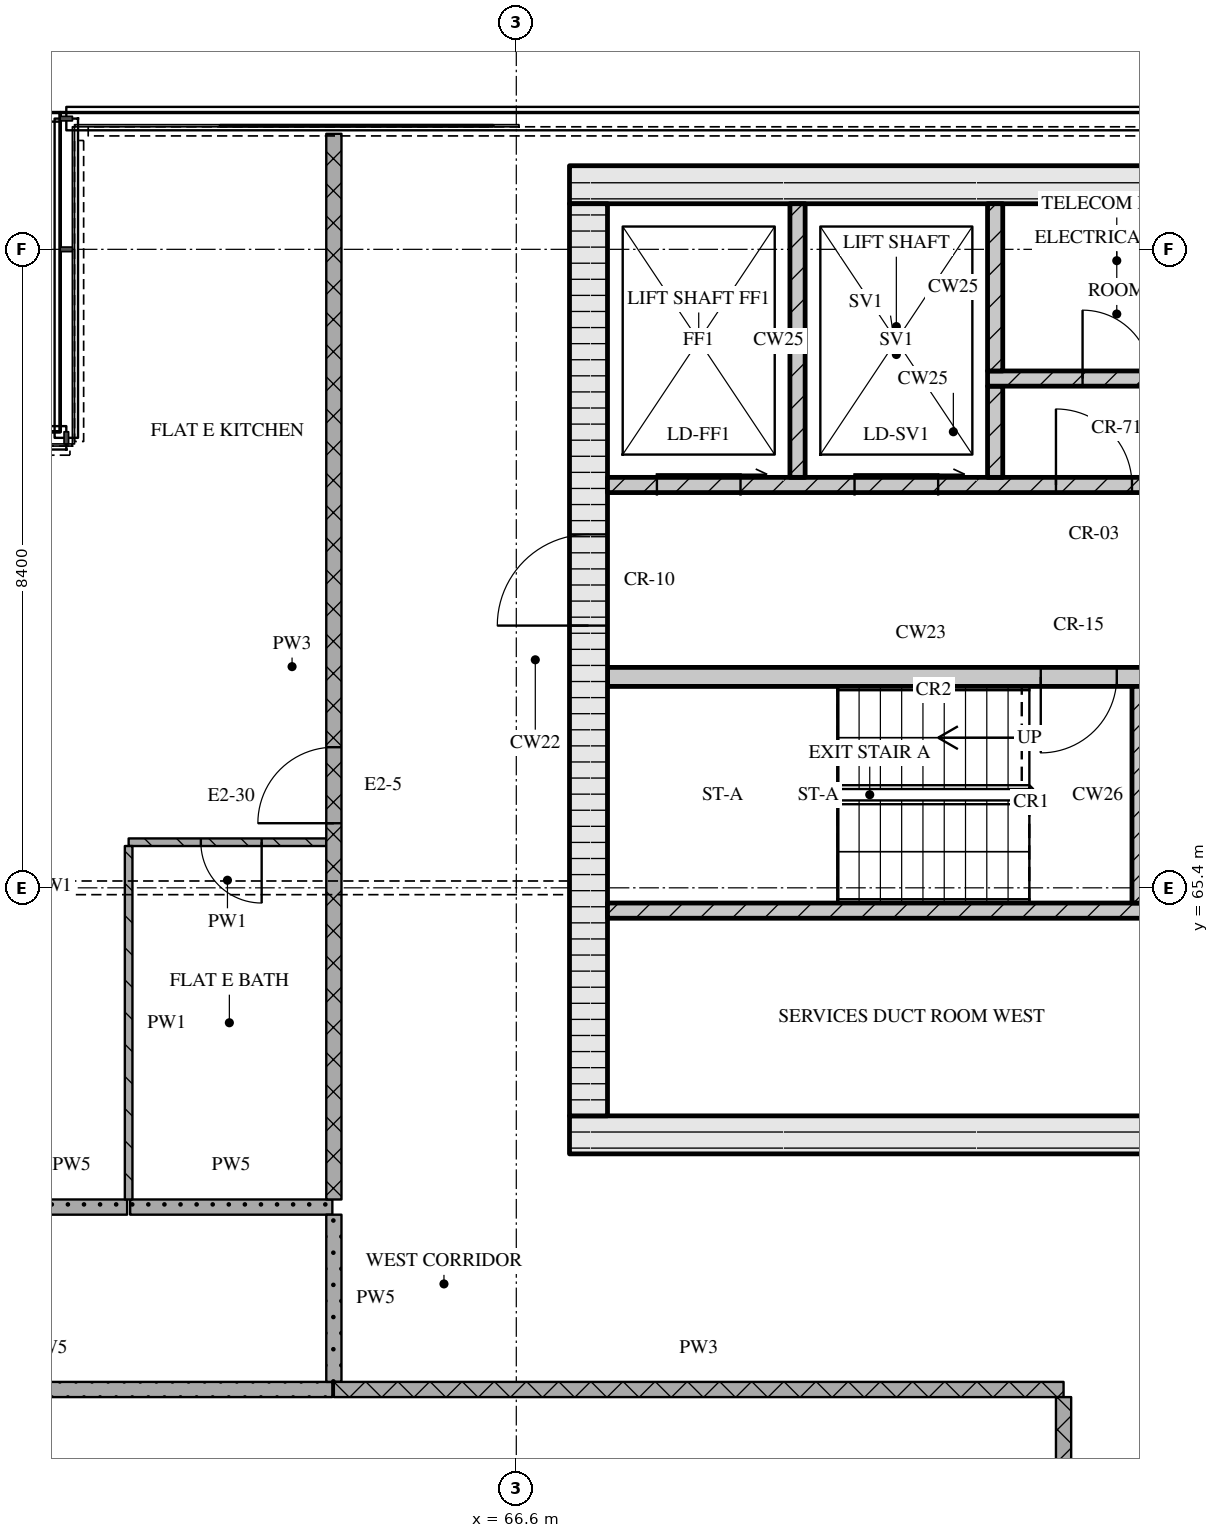
"""IFC4 building model, lengths in metres.
Left out: names, types, materials, properties, quantities, classifications, styles, units other than length and angle.
Written with IfcOpenShell. Run it as: python <this file> out.ifc"""

import sys

from ifc_helpers import new_model, si_unit, direction, frame, frame_2d, origin, place, context, subcontext, project, spatial, rectangle, extrude, element, fill, save


model = new_model("IFC4")
c1 = context("Model", 3, precision=1e-05, world=origin(), true_north=direction((0.0, 1.0)))
c2 = subcontext(c1, "Body", "Model", "MODEL_VIEW")
j1 = project(units=[si_unit("LENGTHUNIT", "METRE"), si_unit("PLANEANGLEUNIT", "RADIAN")], contexts=[c1])
p1 = place(None, origin())
s1 = spatial("IfcSite", under=j1, at=p1, CompositionType="ELEMENT")
p2 = place(p1, origin())
s2 = spatial("IfcBuilding", under=s1, at=p2, CompositionType="ELEMENT")
p3 = place(p2, frame((0.0, 0.0, 270.75)))
s3 = spatial("IfcBuildingStorey", under=s2, at=p3, CompositionType="ELEMENT", Elevation=270.75)
p4 = place(p3, frame((67.3, 62.15, 0.0), z_axis=(0.0, 0.0, 1.0), x_axis=(1.0, 0.0, 0.0)))
e1 = element("IfcWall", 1, at=p4, inside=s3, PredefinedType="SOLIDWALL", context=c2, shape_type="SweptSolid", body=[
    extrude(rectangle(XDim=40.6, YDim=0.5, at=frame_2d((20.3, 0.0))), origin(), (0.0, 0.0, 1.0), 3.32),
])
p5 = place(p4, frame((20.65, 0.0, 0.0)))
e2 = element("IfcOpeningElement", 2, at=p5, cuts=e1, PredefinedType="OPENING", context=c2, shape_type="SweptSolid", body=[
    extrude(rectangle(XDim=1.8, YDim=2.1, at=frame_2d((0.9, 1.05))), frame((0.0, 0.26, 0.0), z_axis=(0.0, -1.0, 0.0), x_axis=(1.0, 0.0, 0.0)), (0.0, 0.0, 1.0), 0.52),
])
p6 = place(p3, frame((67.3, 74.65, 0.0), z_axis=(0.0, 0.0, 1.0), x_axis=(1.0, 0.0, 0.0)))
e3 = element("IfcWall", 3, at=p6, inside=s3, PredefinedType="SOLIDWALL", context=c2, shape_type="SweptSolid", body=[
    extrude(rectangle(XDim=40.6, YDim=0.5, at=frame_2d((20.3, 0.0))), origin(), (0.0, 0.0, 1.0), 3.32),
])
p7 = place(p3, frame((67.55, 62.4, 0.0), z_axis=(0.0, 0.0, 1.0), x_axis=(0.0, 1.0, 0.0)))
e4 = element("IfcWall", 4, at=p7, inside=s3, PredefinedType="SOLIDWALL", context=c2, shape_type="SweptSolid", body=[
    extrude(rectangle(XDim=12.0, YDim=0.5, at=frame_2d((6.0, 0.0))), origin(), (0.0, 0.0, 1.0), 3.32),
])
p8 = place(p7, frame((6.45, 0.0, 0.0)))
e5 = element("IfcOpeningElement", 5, at=p8, cuts=e4, PredefinedType="OPENING", context=c2, shape_type="SweptSolid", body=[
    extrude(rectangle(XDim=1.2, YDim=2.1, at=frame_2d((0.6, 1.05))), frame((0.0, 0.26, 0.0), z_axis=(0.0, -1.0, 0.0), x_axis=(1.0, 0.0, 0.0)), (0.0, 0.0, 1.0), 0.52),
])
p9 = place(p3, frame((67.8, 65.1, 0.0), z_axis=(0.0, 0.0, 1.0), x_axis=(1.0, 0.0, 0.0)))
e6 = element("IfcWall", 6, at=p9, inside=s3, PredefinedType="SOLIDWALL", context=c2, shape_type="SweptSolid", body=[
    extrude(rectangle(XDim=18.5, YDim=0.2, at=frame_2d((9.25, 0.0))), origin(), (0.0, 0.0, 1.0), 3.32),
])
p10 = place(p9, frame((7.27, 0.0, 0.0)))
e7 = element("IfcOpeningElement", 7, at=p10, cuts=e6, PredefinedType="OPENING", context=c2, shape_type="SweptSolid", body=[
    extrude(rectangle(XDim=0.9, YDim=2.1, at=frame_2d((0.45, 1.05))), frame((0.0, 0.11, 0.0), z_axis=(0.0, -1.0, 0.0), x_axis=(1.0, 0.0, 0.0)), (0.0, 0.0, 1.0), 0.22),
])
p11 = place(p9, frame((10.1, 0.0, 0.0)))
e8 = element("IfcOpeningElement", 8, at=p11, cuts=e6, PredefinedType="OPENING", context=c2, shape_type="SweptSolid", body=[
    extrude(rectangle(XDim=0.9, YDim=2.1, at=frame_2d((0.45, 1.05))), frame((0.0, 0.11, 0.0), z_axis=(0.0, -1.0, 0.0), x_axis=(1.0, 0.0, 0.0)), (0.0, 0.0, 1.0), 0.22),
])
p12 = place(p9, frame((13.81, 0.0, 0.0)))
e9 = element("IfcOpeningElement", 9, at=p12, cuts=e6, PredefinedType="OPENING", context=c2, shape_type="SweptSolid", body=[
    extrude(rectangle(XDim=0.9, YDim=2.1, at=frame_2d((0.45, 1.05))), frame((0.0, 0.11, 0.0), z_axis=(0.0, -1.0, 0.0), x_axis=(1.0, 0.0, 0.0)), (0.0, 0.0, 1.0), 0.22),
])
p13 = place(p9, frame((16.7, 0.0, 0.0)))
e10 = element("IfcOpeningElement", 10, at=p13, cuts=e6, PredefinedType="OPENING", context=c2, shape_type="SweptSolid", body=[
    extrude(rectangle(XDim=0.9, YDim=2.1, at=frame_2d((0.45, 1.05))), frame((0.0, 0.11, 0.0), z_axis=(0.0, -1.0, 0.0), x_axis=(1.0, 0.0, 0.0)), (0.0, 0.0, 1.0), 0.22),
])
p14 = place(p3, frame((74.85, 65.2, 0.0), z_axis=(0.0, 0.0, 1.0), x_axis=(0.0, 1.0, 0.0)))
e11 = element("IfcWall", 11, at=p14, inside=s3, PredefinedType="SOLIDWALL", context=c2, shape_type="SweptSolid", body=[
    extrude(rectangle(XDim=2.85, YDim=0.3, at=frame_2d((1.425, 0.0))), origin(), (0.0, 0.0, 1.0), 3.32),
])
p15 = place(p3, frame((67.8, 68.175, 0.0), z_axis=(0.0, 0.0, 1.0), x_axis=(1.0, 0.0, 0.0)))
e12 = element("IfcWall", 12, at=p15, inside=s3, PredefinedType="SOLIDWALL", context=c2, shape_type="SweptSolid", body=[
    extrude(rectangle(XDim=8.25, YDim=0.25, at=frame_2d((4.125, 0.0))), origin(), (0.0, 0.0, 1.0), 3.32),
])
p16 = place(p15, frame((5.7, 0.0, 0.0)))
e13 = element("IfcOpeningElement", 13, at=p16, cuts=e12, PredefinedType="OPENING", context=c2, shape_type="SweptSolid", body=[
    extrude(rectangle(XDim=1.0, YDim=2.1, at=frame_2d((0.5, 1.05))), frame((0.0, 0.135, 0.0), z_axis=(0.0, -1.0, 0.0), x_axis=(1.0, 0.0, 0.0)), (0.0, 0.0, 1.0), 0.27),
])
p17 = place(p15, frame((7.2, 0.0, 0.0)))
e14 = element("IfcOpeningElement", 14, at=p17, cuts=e12, PredefinedType="OPENING", context=c2, shape_type="SweptSolid", body=[
    extrude(rectangle(XDim=0.8, YDim=2.1, at=frame_2d((0.4, 1.05))), frame((0.0, 0.135, 0.0), z_axis=(0.0, -1.0, 0.0), x_axis=(1.0, 0.0, 0.0)), (0.0, 0.0, 1.0), 0.27),
])
p18 = place(p3, frame((67.8, 70.7, 0.0), z_axis=(0.0, 0.0, 1.0), x_axis=(1.0, 0.0, 0.0)))
e15 = element("IfcWall", 15, at=p18, inside=s3, PredefinedType="SOLIDWALL", context=c2, shape_type="SweptSolid", body=[
    extrude(rectangle(XDim=39.6, YDim=0.2, at=frame_2d((19.8, 0.0))), origin(), (0.0, 0.0, 1.0), 3.32),
])
p19 = place(p18, frame((0.65, 0.0, 0.0)))
e16 = element("IfcOpeningElement", 16, at=p19, cuts=e15, PredefinedType="OPENING", context=c2, shape_type="SweptSolid", body=[
    extrude(rectangle(XDim=1.1, YDim=2.1, at=frame_2d((0.55, 1.05))), frame((0.0, 0.11, 0.0), z_axis=(0.0, -1.0, 0.0), x_axis=(1.0, 0.0, 0.0)), (0.0, 0.0, 1.0), 0.22),
])
p20 = place(p18, frame((3.25, 0.0, 0.0)))
e17 = element("IfcOpeningElement", 17, at=p20, cuts=e15, PredefinedType="OPENING", context=c2, shape_type="SweptSolid", body=[
    extrude(rectangle(XDim=1.1, YDim=2.1, at=frame_2d((0.55, 1.05))), frame((0.0, 0.11, 0.0), z_axis=(0.0, -1.0, 0.0), x_axis=(1.0, 0.0, 0.0)), (0.0, 0.0, 1.0), 0.22),
])
p21 = place(p18, frame((5.9, 0.0, 0.0)))
e18 = element("IfcOpeningElement", 18, at=p21, cuts=e15, PredefinedType="OPENING", context=c2, shape_type="SweptSolid", body=[
    extrude(rectangle(XDim=1.0, YDim=2.1, at=frame_2d((0.5, 1.05))), frame((0.0, 0.11, 0.0), z_axis=(0.0, -1.0, 0.0), x_axis=(1.0, 0.0, 0.0)), (0.0, 0.0, 1.0), 0.22),
])
p22 = place(p18, frame((21.7, 0.0, 0.0)))
e19 = element("IfcOpeningElement", 19, at=p22, cuts=e15, PredefinedType="OPENING", context=c2, shape_type="SweptSolid", body=[
    extrude(rectangle(XDim=1.0, YDim=2.1, at=frame_2d((0.5, 1.05))), frame((0.0, 0.11, 0.0), z_axis=(0.0, -1.0, 0.0), x_axis=(1.0, 0.0, 0.0)), (0.0, 0.0, 1.0), 0.22),
])
p23 = place(p18, frame((32.7, 0.0, 0.0)))
e20 = element("IfcOpeningElement", 20, at=p23, cuts=e15, PredefinedType="OPENING", context=c2, shape_type="SweptSolid", body=[
    extrude(rectangle(XDim=1.0, YDim=2.1, at=frame_2d((0.5, 1.05))), frame((0.0, 0.11, 0.0), z_axis=(0.0, -1.0, 0.0), x_axis=(1.0, 0.0, 0.0)), (0.0, 0.0, 1.0), 0.22),
])
p24 = place(p18, frame((35.25, 0.0, 0.0)))
e21 = element("IfcOpeningElement", 21, at=p24, cuts=e15, PredefinedType="OPENING", context=c2, shape_type="SweptSolid", body=[
    extrude(rectangle(XDim=1.1, YDim=2.1, at=frame_2d((0.55, 1.05))), frame((0.0, 0.11, 0.0), z_axis=(0.0, -1.0, 0.0), x_axis=(1.0, 0.0, 0.0)), (0.0, 0.0, 1.0), 0.22),
])
p25 = place(p18, frame((37.85, 0.0, 0.0)))
e22 = element("IfcOpeningElement", 22, at=p25, cuts=e15, PredefinedType="OPENING", context=c2, shape_type="SweptSolid", body=[
    extrude(rectangle(XDim=1.1, YDim=2.1, at=frame_2d((0.55, 1.05))), frame((0.0, 0.11, 0.0), z_axis=(0.0, -1.0, 0.0), x_axis=(1.0, 0.0, 0.0)), (0.0, 0.0, 1.0), 0.22),
])
p26 = place(p3, frame((70.3, 70.8, 0.0), z_axis=(0.0, 0.0, 1.0), x_axis=(0.0, 1.0, 0.0)))
e23 = element("IfcWall", 23, at=p26, inside=s3, PredefinedType="SOLIDWALL", context=c2, shape_type="SweptSolid", body=[
    extrude(rectangle(XDim=3.6, YDim=0.2, at=frame_2d((1.8, 0.0))), origin(), (0.0, 0.0, 1.0), 3.32),
])
p27 = place(p3, frame((72.9, 70.8, 0.0), z_axis=(0.0, 0.0, 1.0), x_axis=(0.0, 1.0, 0.0)))
e24 = element("IfcWall", 24, at=p27, inside=s3, PredefinedType="SOLIDWALL", context=c2, shape_type="SweptSolid", body=[
    extrude(rectangle(XDim=1.2, YDim=0.2, at=frame_2d((0.6, 0.0))), origin(), (0.0, 0.0, 1.0), 3.32),
])
p28 = place(p3, frame((72.8, 72.1, 0.0), z_axis=(0.0, 0.0, 1.0), x_axis=(1.0, 0.0, 0.0)))
e25 = element("IfcWall", 25, at=p28, inside=s3, PredefinedType="SOLIDWALL", context=c2, shape_type="SweptSolid", body=[
    extrude(rectangle(XDim=11.0, YDim=0.2, at=frame_2d((5.5, 0.0))), origin(), (0.0, 0.0, 1.0), 3.32),
])
p29 = place(p28, frame((1.25, 0.0, 0.0)))
e26 = element("IfcOpeningElement", 26, at=p29, cuts=e25, PredefinedType="OPENING", context=c2, shape_type="SweptSolid", body=[
    extrude(rectangle(XDim=0.9, YDim=2.1, at=frame_2d((0.45, 1.05))), frame((0.0, 0.11, 0.0), z_axis=(0.0, -1.0, 0.0), x_axis=(1.0, 0.0, 0.0)), (0.0, 0.0, 1.0), 0.22),
])
p30 = place(p28, frame((4.65, 0.0, 0.0)))
e27 = element("IfcOpeningElement", 27, at=p30, cuts=e25, PredefinedType="OPENING", context=c2, shape_type="SweptSolid", body=[
    extrude(rectangle(XDim=0.9, YDim=2.1, at=frame_2d((0.45, 1.05))), frame((0.0, 0.11, 0.0), z_axis=(0.0, -1.0, 0.0), x_axis=(1.0, 0.0, 0.0)), (0.0, 0.0, 1.0), 0.22),
])
p31 = place(p28, frame((7.47, 0.0, 0.0)))
e28 = element("IfcOpeningElement", 28, at=p31, cuts=e25, PredefinedType="OPENING", context=c2, shape_type="SweptSolid", body=[
    extrude(rectangle(XDim=0.9, YDim=2.1, at=frame_2d((0.45, 1.05))), frame((0.0, 0.11, 0.0), z_axis=(0.0, -1.0, 0.0), x_axis=(1.0, 0.0, 0.0)), (0.0, 0.0, 1.0), 0.22),
])
p32 = place(p28, frame((9.445, 0.0, 0.0)))
e29 = element("IfcOpeningElement", 29, at=p32, cuts=e25, PredefinedType="OPENING", context=c2, shape_type="SweptSolid", body=[
    extrude(rectangle(XDim=0.9, YDim=2.1, at=frame_2d((0.45, 1.05))), frame((0.0, 0.11, 0.0), z_axis=(0.0, -1.0, 0.0), x_axis=(1.0, 0.0, 0.0)), (0.0, 0.0, 1.0), 0.22),
])
p33 = place(p3, frame((72.9, 72.2, 0.0), z_axis=(0.0, 0.0, 1.0), x_axis=(0.0, 1.0, 0.0)))
e30 = element("IfcWall", 30, at=p33, inside=s3, PredefinedType="SOLIDWALL", context=c2, shape_type="SweptSolid", body=[
    extrude(rectangle(XDim=2.2, YDim=0.2, at=frame_2d((1.1, 0.0))), origin(), (0.0, 0.0, 1.0), 3.32),
])
p34 = place(p3, frame((64.2, 58.8, 0.0), z_axis=(0.0, 0.0, 1.0), x_axis=(1.0, 0.0, 0.0)))
e31 = element("IfcWall", 31, at=p34, inside=s3, PredefinedType="PARTITIONING", context=c2, shape_type="SweptSolid", body=[
    extrude(rectangle(XDim=9.6, YDim=0.2, at=frame_2d((4.8, 0.0))), origin(), (0.0, 0.0, 1.0), 3.32),
])
p35 = place(p3, frame((56.7, 58.8, 0.0), z_axis=(0.0, 0.0, 1.0), x_axis=(1.0, 0.0, 0.0)))
e32 = element("IfcWall", 32, at=p35, inside=s3, PredefinedType="PARTITIONING", context=c2, shape_type="SweptSolid", body=[
    extrude(rectangle(XDim=7.48, YDim=0.2, at=frame_2d((3.74, 0.0))), origin(), (0.0, 0.0, 1.0), 3.32),
])
p36 = place(p3, frame((60.02, 61.2, 0.0), z_axis=(0.0, 0.0, 1.0), x_axis=(1.0, 0.0, 0.0)))
e33 = element("IfcWall", 33, at=p36, inside=s3, PredefinedType="PARTITIONING", context=c2, shape_type="SweptSolid", body=[
    extrude(rectangle(XDim=1.46, YDim=0.2, at=frame_2d((0.73, 0.0))), origin(), (0.0, 0.0, 1.0), 3.32),
])
p37 = place(p3, frame((61.52, 61.2, 0.0), z_axis=(0.0, 0.0, 1.0), x_axis=(1.0, 0.0, 0.0)))
e34 = element("IfcWall", 34, at=p37, inside=s3, PredefinedType="PARTITIONING", context=c2, shape_type="SweptSolid", body=[
    extrude(rectangle(XDim=2.66, YDim=0.2, at=frame_2d((1.33, 0.0))), origin(), (0.0, 0.0, 1.0), 3.32),
])
p38 = place(p3, frame((64.1, 66.0, 0.0), z_axis=(0.0, 0.0, 1.0), x_axis=(-1.0, 0.0, 0.0)))
e35 = element("IfcWall", 35, at=p38, inside=s3, PredefinedType="PARTITIONING", context=c2, shape_type="SweptSolid", body=[
    extrude(rectangle(XDim=2.6, YDim=0.1, at=frame_2d((1.3, 0.0))), origin(), (0.0, 0.0, 1.0), 3.32),
])
p39 = place(p38, frame((0.85, 0.0, 0.0)))
e36 = element("IfcOpeningElement", 36, at=p39, cuts=e35, PredefinedType="OPENING", context=c2, shape_type="SweptSolid", body=[
    extrude(rectangle(XDim=0.8, YDim=2.1, at=frame_2d((0.4, 1.05))), frame((0.0, 0.06, 0.0), z_axis=(0.0, -1.0, 0.0), x_axis=(1.0, 0.0, 0.0)), (0.0, 0.0, 1.0), 0.12),
])
p40 = place(p3, frame((61.5, 65.95, 0.0), z_axis=(0.0, 0.0, 1.0), x_axis=(0.0, -1.0, 0.0)))
e37 = element("IfcWall", 37, at=p40, inside=s3, PredefinedType="PARTITIONING", context=c2, shape_type="SweptSolid", body=[
    extrude(rectangle(XDim=4.65, YDim=0.1, at=frame_2d((2.325, 0.0))), origin(), (0.0, 0.0, 1.0), 3.32),
])
p41 = place(p3, frame((64.2, 61.3, 0.0), z_axis=(0.0, 0.0, 1.0), x_axis=(0.0, 1.0, 0.0)))
e38 = element("IfcWall", 38, at=p41, inside=s3, PredefinedType="PARTITIONING", context=c2, shape_type="SweptSolid", body=[
    extrude(rectangle(XDim=14.02, YDim=0.2, at=frame_2d((7.01, 0.0))), origin(), (0.0, 0.0, 1.0), 3.32),
])
p42 = place(p41, frame((4.95, 0.0, 0.0)))
e39 = element("IfcOpeningElement", 39, at=p42, cuts=e38, PredefinedType="OPENING", context=c2, shape_type="SweptSolid", body=[
    extrude(rectangle(XDim=1.0, YDim=2.1, at=frame_2d((0.5, 1.05))), frame((0.0, 0.11, 0.0), z_axis=(0.0, -1.0, 0.0), x_axis=(1.0, 0.0, 0.0)), (0.0, 0.0, 1.0), 0.22),
])
p43 = place(p3, frame((64.2, 61.1, 0.0), z_axis=(0.0, 0.0, 1.0), x_axis=(0.0, -1.0, 0.0)))
e40 = element("IfcWall", 40, at=p43, inside=s3, PredefinedType="PARTITIONING", context=c2, shape_type="SweptSolid", body=[
    extrude(rectangle(XDim=2.2, YDim=0.2, at=frame_2d((1.1, 0.0))), origin(), (0.0, 0.0, 1.0), 3.32),
])
p44 = place(p3, frame((73.8, 50.7, 0.0), z_axis=(0.0, 0.0, 1.0), x_axis=(0.0, 1.0, 0.0)))
e41 = element("IfcWall", 41, at=p44, inside=s3, PredefinedType="PARTITIONING", context=c2, shape_type="SweptSolid", body=[
    extrude(rectangle(XDim=8.0, YDim=0.2, at=frame_2d((4.0, 0.0))), origin(), (0.0, 0.0, 1.0), 3.32),
])
p45 = place(p44, frame((4.15, 0.0, 0.0)))
e42 = element("IfcOpeningElement", 42, at=p45, cuts=e41, PredefinedType="OPENING", context=c2, shape_type="SweptSolid", body=[
    extrude(rectangle(XDim=1.0, YDim=2.1, at=frame_2d((0.5, 1.05))), frame((0.0, 0.11, 0.0), z_axis=(0.0, -1.0, 0.0), x_axis=(1.0, 0.0, 0.0)), (0.0, 0.0, 1.0), 0.22),
])
p46 = place(p16, origin())
e43 = element("IfcDoor", 43, at=p46, inside=s3, OperationType="SINGLE_SWING_RIGHT", PredefinedType="DOOR", context=c2, shape_type="SweptSolid", body=[
    extrude(rectangle(XDim=1.0, YDim=2.1, at=frame_2d((0.5, 1.05))), frame((0.0, 0.025, 0.0), z_axis=(0.0, -1.0, 0.0), x_axis=(1.0, 0.0, 0.0)), (0.0, 0.0, 1.0), 0.05),
])
fill(e13, e43)
p47 = place(p8, origin())
e44 = element("IfcDoor", 44, at=p47, inside=s3, OperationType="SINGLE_SWING_LEFT", PredefinedType="DOOR", context=c2, shape_type="SweptSolid", body=[
    extrude(rectangle(XDim=1.2, YDim=2.1, at=frame_2d((0.6, 1.05))), frame((0.0, 0.025, 0.0), z_axis=(0.0, -1.0, 0.0), x_axis=(1.0, 0.0, 0.0)), (0.0, 0.0, 1.0), 0.05),
])
fill(e5, e44)
p48 = place(p19, origin())
e45 = element("IfcDoor", 45, at=p48, inside=s3, OperationType="SLIDING_TO_RIGHT", PredefinedType="DOOR", context=c2, shape_type="SweptSolid", body=[
    extrude(rectangle(XDim=1.1, YDim=2.1, at=frame_2d((0.55, 1.05))), frame((0.0, 0.025, 0.0), z_axis=(0.0, -1.0, 0.0), x_axis=(1.0, 0.0, 0.0)), (0.0, 0.0, 1.0), 0.05),
])
fill(e16, e45)
p49 = place(p20, origin())
e46 = element("IfcDoor", 46, at=p49, inside=s3, OperationType="SLIDING_TO_RIGHT", PredefinedType="DOOR", context=c2, shape_type="SweptSolid", body=[
    extrude(rectangle(XDim=1.1, YDim=2.1, at=frame_2d((0.55, 1.05))), frame((0.0, 0.025, 0.0), z_axis=(0.0, -1.0, 0.0), x_axis=(1.0, 0.0, 0.0)), (0.0, 0.0, 1.0), 0.05),
])
fill(e17, e46)
p50 = place(p21, origin())
e47 = element("IfcDoor", 47, at=p50, inside=s3, OperationType="SINGLE_SWING_LEFT", PredefinedType="DOOR", context=c2, shape_type="SweptSolid", body=[
    extrude(rectangle(XDim=1.0, YDim=2.1, at=frame_2d((0.5, 1.05))), frame((0.0, 0.025, 0.0), z_axis=(0.0, -1.0, 0.0), x_axis=(1.0, 0.0, 0.0)), (0.0, 0.0, 1.0), 0.05),
])
fill(e18, e47)
p51 = place(p29, origin())
e48 = element("IfcDoor", 48, at=p51, inside=s3, OperationType="SINGLE_SWING_LEFT", PredefinedType="DOOR", context=c2, shape_type="SweptSolid", body=[
    extrude(rectangle(XDim=0.9, YDim=2.1, at=frame_2d((0.45, 1.05))), frame((0.0, 0.025, 0.0), z_axis=(0.0, -1.0, 0.0), x_axis=(1.0, 0.0, 0.0)), (0.0, 0.0, 1.0), 0.05),
])
fill(e26, e48)
p52 = place(p39, origin())
e49 = element("IfcDoor", 49, at=p52, inside=s3, OperationType="SINGLE_SWING_LEFT", PredefinedType="DOOR", context=c2, shape_type="SweptSolid", body=[
    extrude(rectangle(XDim=0.8, YDim=2.1, at=frame_2d((0.4, 1.05))), frame((0.0, 0.025, 0.0), z_axis=(0.0, -1.0, 0.0), x_axis=(1.0, 0.0, 0.0)), (0.0, 0.0, 1.0), 0.05),
])
fill(e36, e49)
p53 = place(p42, origin())
e50 = element("IfcDoor", 50, at=p53, inside=s3, OperationType="SINGLE_SWING_LEFT", PredefinedType="DOOR", context=c2, shape_type="SweptSolid", body=[
    extrude(rectangle(XDim=1.0, YDim=2.1, at=frame_2d((0.5, 1.05))), frame((0.0, 0.025, 0.0), z_axis=(0.0, -1.0, 0.0), x_axis=(1.0, 0.0, 0.0)), (0.0, 0.0, 1.0), 0.05),
])
fill(e39, e50)
save(model, sys.argv[1])
